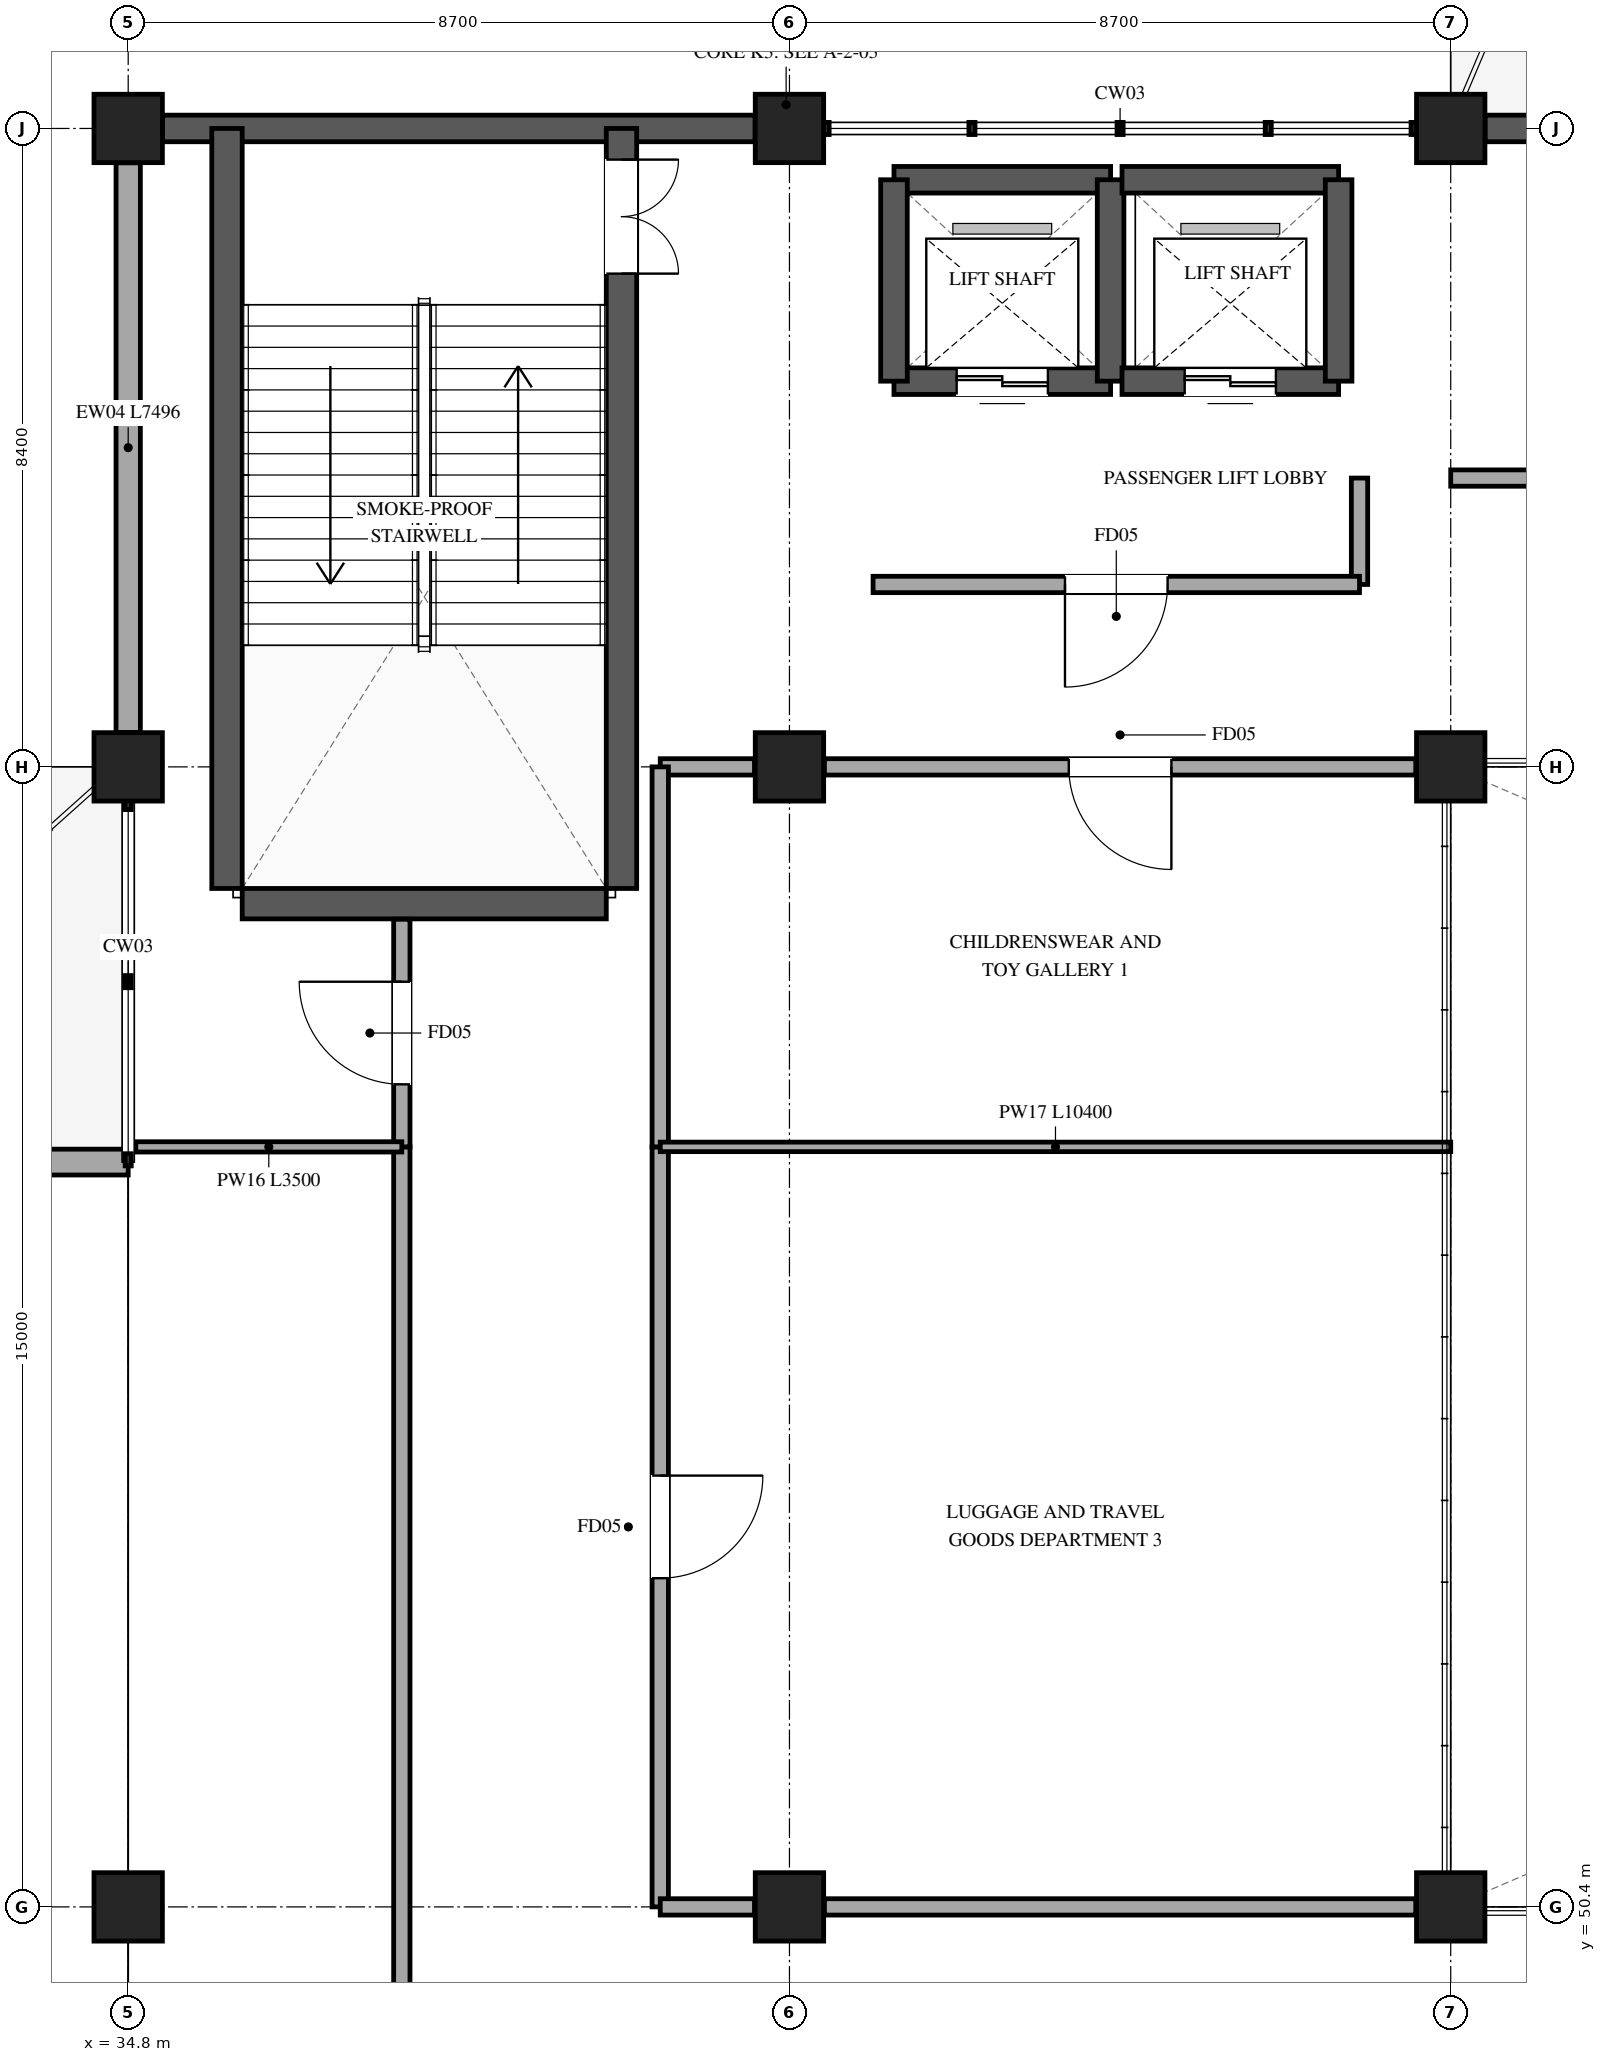
"""IFC4 building model, lengths in metres.
Left out: names, types, materials, properties, quantities, classifications, styles, units other than length and angle.
Written with IfcOpenShell. Run it as: python <this file> out.ifc"""

import sys

from ifc_helpers import new_model, si_unit, direction, frame, frame_2d, origin, origin_2d, place, context, subcontext, project, spatial, rectangle, extrude, element, fill, save


model = new_model("IFC4")
c1 = context("Model", 3, precision=1e-05, world=origin(), true_north=direction((0.0, 1.0)))
c2 = subcontext(c1, "Body", "Model", "MODEL_VIEW")
j1 = project(units=[si_unit("LENGTHUNIT", "METRE"), si_unit("PLANEANGLEUNIT", "RADIAN")], contexts=[c1])
p1 = place(None, origin())
s1 = spatial("IfcSite", under=j1, at=p1, CompositionType="ELEMENT")
p2 = place(p1, origin())
s2 = spatial("IfcBuilding", under=s1, at=p2, CompositionType="ELEMENT")
p3 = place(p2, frame((0.0, 0.0, 11.4)))
s3 = spatial("IfcBuildingStorey", under=s2, at=p3, CompositionType="ELEMENT", Elevation=11.4)
for number, where, z_axis, x_axis in (
    (1, (34.8, 50.4, 0.0), (0.0, 0.0, 1.0), (1.0, 0.0, 0.0)),
    (2, (34.8, 65.4, 0.0), (0.0, 0.0, 1.0), (1.0, 0.0, 0.0)),
    (3, (34.8, 73.8, 0.0), (0.0, 0.0, 1.0), (1.0, 0.0, 0.0)),
    (4, (43.5, 50.4, 0.0), (0.0, 0.0, 1.0), (1.0, 0.0, 0.0)),
    (5, (43.5, 65.4, 0.0), (0.0, 0.0, 1.0), (1.0, 0.0, 0.0)),
    (6, (43.5, 73.8, 0.0), (0.0, 0.0, 1.0), (1.0, 0.0, 0.0)),
    (7, (52.2, 50.4, 0.0), (0.0, 0.0, 1.0), (1.0, 0.0, 0.0)),
    (8, (52.2, 65.4, 0.0), (0.0, 0.0, 1.0), (1.0, 0.0, 0.0)),
    (9, (52.2, 73.8, 0.0), (0.0, 0.0, 1.0), (1.0, 0.0, 0.0)),
):
    element("IfcColumn", number, at=place(p3, frame(where, z_axis=z_axis, x_axis=x_axis)), inside=s3, PredefinedType="COLUMN", context=c2, shape_type="SweptSolid", body=[
        extrude(rectangle(XDim=0.9, YDim=0.9, at=origin_2d()), origin(), (0.0, 0.0, 1.0), 5.1),
    ])
p4 = place(p3, frame((25.7, 60.2, 0.0), z_axis=(0.0, 0.0, 1.0), x_axis=(1.0, 0.0, 0.0)))
e10 = element("IfcWall", 10, at=p4, inside=s3, PredefinedType="STANDARD", context=c2, shape_type="SweptSolid", body=[
    extrude(rectangle(XDim=9.1, YDim=0.34, at=frame_2d((4.55, 0.0))), origin(), (0.0, 0.0, 1.0), 4.317),
])
p5 = place(p4, frame((2.55, 0.0, 0.85)))
e11 = element("IfcOpeningElement", 11, at=p5, cuts=e10, PredefinedType="OPENING", context=c2, shape_type="SweptSolid", body=[
    extrude(rectangle(XDim=4.0, YDim=2.15, at=frame_2d((2.0, 1.075))), frame((0.0, 0.18, 0.0), z_axis=(0.0, -1.0, 0.0), x_axis=(1.0, 0.0, 0.0)), (0.0, 0.0, 1.0), 0.36),
])
p6 = place(p3, frame((34.8, 65.852, 0.0), z_axis=(0.0, 0.0, 1.0), x_axis=(0.0, 1.0, 0.0)))
e12 = element("IfcWall", 12, at=p6, inside=s3, PredefinedType="STANDARD", context=c2, shape_type="SweptSolid", body=[
    extrude(rectangle(XDim=7.496, YDim=0.32, at=frame_2d((3.748, 0.0))), origin(), (0.0, 0.0, 1.0), 4.155),
])
p7 = place(p3, frame((35.252, 73.8, 0.0), z_axis=(0.0, 0.0, 1.0), x_axis=(1.0, 0.0, 0.0)))
e13 = element("IfcWall", 13, at=p7, inside=s3, PredefinedType="STANDARD", context=c2, shape_type="SweptSolid", body=[
    extrude(rectangle(XDim=7.796, YDim=0.35, at=frame_2d((3.898, 0.0))), origin(), (0.0, 0.0, 1.0), 4.79),
])
p8 = place(p3, frame((52.652, 73.8, 0.0), z_axis=(0.0, 0.0, 1.0), x_axis=(1.0, 0.0, 0.0)))
e14 = element("IfcWall", 14, at=p8, inside=s3, PredefinedType="STANDARD", context=c2, shape_type="SweptSolid", body=[
    extrude(rectangle(XDim=5.348, YDim=0.35, at=frame_2d((2.674, 0.0))), origin(), (0.0, 0.0, 1.0), 4.79),
])
p9 = place(p8, frame((2.124, 0.0, 0.0)))
e15 = element("IfcOpeningElement", 15, at=p9, cuts=e14, PredefinedType="OPENING", context=c2, shape_type="SweptSolid", body=[
    extrude(rectangle(XDim=1.1, YDim=2.2, at=frame_2d((0.55, 1.1))), frame((0.0, 0.185, 0.0), z_axis=(0.0, -1.0, 0.0), x_axis=(1.0, 0.0, 0.0)), (0.0, 0.0, 1.0), 0.37),
])
p10 = place(p3, frame((36.1, 63.8, 0.0), z_axis=(0.0, 0.0, 1.0), x_axis=(0.0, 1.0, 0.0)))
e16 = element("IfcWall", 16, at=p10, inside=s3, PredefinedType="SHEAR", context=c2, shape_type="SweptSolid", body=[
    extrude(rectangle(XDim=10.0, YDim=0.4, at=frame_2d((5.0, 0.0))), origin(), (0.0, 0.0, 1.0), 5.1),
])
p11 = place(p3, frame((41.29, 73.8, 0.0), z_axis=(0.0, 0.0, 1.0), x_axis=(0.0, -1.0, 0.0)))
e17 = element("IfcWall", 17, at=p11, inside=s3, PredefinedType="SHEAR", context=c2, shape_type="SweptSolid", body=[
    extrude(rectangle(XDim=10.0, YDim=0.4, at=frame_2d((5.0, 0.0))), origin(), (0.0, 0.0, 1.0), 5.1),
])
p12 = place(p11, frame((0.41, 0.0, 0.0)))
e18 = element("IfcOpeningElement", 18, at=p12, cuts=e17, PredefinedType="OPENING", context=c2, shape_type="SweptSolid", body=[
    extrude(rectangle(XDim=1.5, YDim=2.2, at=frame_2d((0.75, 1.1))), frame((0.0, 0.21, 0.0), z_axis=(0.0, -1.0, 0.0), x_axis=(1.0, 0.0, 0.0)), (0.0, 0.0, 1.0), 0.42),
])
p13 = place(p3, frame((41.09, 63.6, 0.0), z_axis=(0.0, 0.0, 1.0), x_axis=(-1.0, 0.0, 0.0)))
e19 = element("IfcWall", 19, at=p13, inside=s3, PredefinedType="SHEAR", context=c2, shape_type="SweptSolid", body=[
    extrude(rectangle(XDim=4.79, YDim=0.4, at=frame_2d((2.395, 0.0))), origin(), (0.0, 0.0, 1.0), 5.1),
])
p14 = place(p3, frame((44.875, 73.125, 0.0), z_axis=(0.0, 0.0, 1.0), x_axis=(1.0, 0.0, 0.0)))
e20 = element("IfcWall", 20, at=p14, inside=s3, PredefinedType="SHEAR", context=c2, shape_type="SweptSolid", body=[
    extrude(rectangle(XDim=2.85, YDim=0.35, at=frame_2d((1.425, 0.0))), origin(), (0.0, 0.0, 1.0), 5.1),
])
p15 = place(p3, frame((47.725, 70.475, 0.0), z_axis=(0.0, 0.0, 1.0), x_axis=(-1.0, 0.0, 0.0)))
e21 = element("IfcWall", 21, at=p15, inside=s3, PredefinedType="SHEAR", context=c2, shape_type="SweptSolid", body=[
    extrude(rectangle(XDim=2.85, YDim=0.35, at=frame_2d((1.425, 0.0))), origin(), (0.0, 0.0, 1.0), 5.1),
])
p16 = place(p15, frame((0.825, 0.0, 0.0)))
e22 = element("IfcOpeningElement", 22, at=p16, cuts=e21, PredefinedType="OPENING", context=c2, shape_type="SweptSolid", body=[
    extrude(rectangle(XDim=1.2, YDim=2.2, at=frame_2d((0.6, 1.1))), frame((0.0, 0.185, 0.0), z_axis=(0.0, -1.0, 0.0), x_axis=(1.0, 0.0, 0.0)), (0.0, 0.0, 1.0), 0.37),
])
for number, where, z_axis, x_axis in (
    (23, (44.875, 70.475, 0.0), (0.0, 0.0, 1.0), (0.0, 1.0, 0.0)),
    (24, (47.725, 73.125, 0.0), (0.0, 0.0, 1.0), (0.0, -1.0, 0.0)),
):
    element("IfcWall", number, at=place(p3, frame(where, z_axis=z_axis, x_axis=x_axis)), inside=s3, PredefinedType="SHEAR", context=c2, shape_type="SweptSolid", body=[
        extrude(rectangle(XDim=2.65, YDim=0.35, at=frame_2d((1.325, 0.0))), origin(), (0.0, 0.0, 1.0), 5.1),
    ])
p17 = place(p3, frame((47.875, 73.125, 0.0), z_axis=(0.0, 0.0, 1.0), x_axis=(1.0, 0.0, 0.0)))
e25 = element("IfcWall", 25, at=p17, inside=s3, PredefinedType="SHEAR", context=c2, shape_type="SweptSolid", body=[
    extrude(rectangle(XDim=2.85, YDim=0.35, at=frame_2d((1.425, 0.0))), origin(), (0.0, 0.0, 1.0), 5.1),
])
p18 = place(p3, frame((50.725, 70.475, 0.0), z_axis=(0.0, 0.0, 1.0), x_axis=(-1.0, 0.0, 0.0)))
e26 = element("IfcWall", 26, at=p18, inside=s3, PredefinedType="SHEAR", context=c2, shape_type="SweptSolid", body=[
    extrude(rectangle(XDim=2.85, YDim=0.35, at=frame_2d((1.425, 0.0))), origin(), (0.0, 0.0, 1.0), 5.1),
])
p19 = place(p18, frame((0.825, 0.0, 0.0)))
e27 = element("IfcOpeningElement", 27, at=p19, cuts=e26, PredefinedType="OPENING", context=c2, shape_type="SweptSolid", body=[
    extrude(rectangle(XDim=1.2, YDim=2.2, at=frame_2d((0.6, 1.1))), frame((0.0, 0.185, 0.0), z_axis=(0.0, -1.0, 0.0), x_axis=(1.0, 0.0, 0.0)), (0.0, 0.0, 1.0), 0.37),
])
p20 = place(p3, frame((50.725, 73.125, 0.0), z_axis=(0.0, 0.0, 1.0), x_axis=(0.0, -1.0, 0.0)))
e28 = element("IfcWall", 28, at=p20, inside=s3, PredefinedType="SHEAR", context=c2, shape_type="SweptSolid", body=[
    extrude(rectangle(XDim=2.65, YDim=0.35, at=frame_2d((1.325, 0.0))), origin(), (0.0, 0.0, 1.0), 5.1),
])
p21 = place(p3, frame((51.0, 69.2, 0.0), z_axis=(0.0, 0.0, 1.0), x_axis=(0.0, -1.0, 0.0)))
e29 = element("IfcWall", 29, at=p21, inside=s3, PredefinedType="PARTITIONING", context=c2, shape_type="SweptSolid", body=[
    extrude(rectangle(XDim=1.4, YDim=0.215, at=frame_2d((0.7, 0.0))), origin(), (0.0, 0.0, 1.0), 4.76),
])
p22 = place(p3, frame((51.0, 67.8, 0.0), z_axis=(0.0, 0.0, 1.0), x_axis=(-1.0, 0.0, 0.0)))
e30 = element("IfcWall", 30, at=p22, inside=s3, PredefinedType="PARTITIONING", context=c2, shape_type="SweptSolid", body=[
    extrude(rectangle(XDim=6.4, YDim=0.215, at=frame_2d((3.2, 0.0))), origin(), (0.0, 0.0, 1.0), 4.76),
])
p23 = place(p22, frame((2.525, 0.0, 0.0)))
e31 = element("IfcOpeningElement", 31, at=p23, cuts=e30, PredefinedType="OPENING", context=c2, shape_type="SweptSolid", body=[
    extrude(rectangle(XDim=1.35, YDim=2.2, at=frame_2d((0.675, 1.1))), frame((0.0, 0.118, 0.0), z_axis=(0.0, -1.0, 0.0), x_axis=(1.0, 0.0, 0.0)), (0.0, 0.0, 1.0), 0.235),
])
p24 = place(p3, frame((38.4, 47.4, 0.0), z_axis=(0.0, 0.0, 1.0), x_axis=(0.0, 1.0, 0.0)))
e32 = element("IfcWall", 32, at=p24, inside=s3, PredefinedType="PARTITIONING", context=c2, shape_type="SweptSolid", body=[
    extrude(rectangle(XDim=13.0, YDim=0.215, at=frame_2d((6.5, 0.0))), origin(), (0.0, 0.0, 1.0), 3.86),
])
p25 = place(p3, frame((41.8, 60.4, 0.0), z_axis=(0.0, 0.0, 1.0), x_axis=(0.0, -1.0, 0.0)))
e33 = element("IfcWall", 33, at=p25, inside=s3, PredefinedType="PARTITIONING", context=c2, shape_type="SweptSolid", body=[
    extrude(rectangle(XDim=10.0, YDim=0.215, at=frame_2d((5.0, 0.0))), origin(), (0.0, 0.0, 1.0), 3.86),
])
p26 = place(p25, frame((4.325, 0.0, 0.0)))
e34 = element("IfcOpeningElement", 34, at=p26, cuts=e33, PredefinedType="OPENING", context=c2, shape_type="SweptSolid", body=[
    extrude(rectangle(XDim=1.35, YDim=2.2, at=frame_2d((0.675, 1.1))), frame((0.0, 0.118, 0.0), z_axis=(0.0, -1.0, 0.0), x_axis=(1.0, 0.0, 0.0)), (0.0, 0.0, 1.0), 0.235),
])
p27 = place(p3, frame((41.8, 50.4, 0.0), z_axis=(0.0, 0.0, 1.0), x_axis=(1.0, 0.0, 0.0)))
e35 = element("IfcWall", 35, at=p27, inside=s3, PredefinedType="PARTITIONING", context=c2, shape_type="SweptSolid", body=[
    extrude(rectangle(XDim=1.24, YDim=0.215, at=frame_2d((0.62, 0.0))), origin(), (0.0, 0.0, 1.0), 3.86),
])
p28 = place(p3, frame((43.96, 50.4, 0.0), z_axis=(0.0, 0.0, 1.0), x_axis=(1.0, 0.0, 0.0)))
e36 = element("IfcWall", 36, at=p28, inside=s3, PredefinedType="PARTITIONING", context=c2, shape_type="SweptSolid", body=[
    extrude(rectangle(XDim=7.78, YDim=0.215, at=frame_2d((3.89, 0.0))), origin(), (0.0, 0.0, 1.0), 3.86),
])
p29 = place(p3, frame((51.74, 65.4, 0.0), z_axis=(0.0, 0.0, 1.0), x_axis=(-1.0, 0.0, 0.0)))
e37 = element("IfcWall", 37, at=p29, inside=s3, PredefinedType="PARTITIONING", context=c2, shape_type="SweptSolid", body=[
    extrude(rectangle(XDim=7.78, YDim=0.215, at=frame_2d((3.89, 0.0))), origin(), (0.0, 0.0, 1.0), 3.86),
])
p30 = place(p29, frame((3.215, 0.0, 0.0)))
e38 = element("IfcOpeningElement", 38, at=p30, cuts=e37, PredefinedType="OPENING", context=c2, shape_type="SweptSolid", body=[
    extrude(rectangle(XDim=1.35, YDim=2.2, at=frame_2d((0.675, 1.1))), frame((0.0, 0.118, 0.0), z_axis=(0.0, -1.0, 0.0), x_axis=(1.0, 0.0, 0.0)), (0.0, 0.0, 1.0), 0.235),
])
p31 = place(p3, frame((43.04, 65.4, 0.0), z_axis=(0.0, 0.0, 1.0), x_axis=(-1.0, 0.0, 0.0)))
e39 = element("IfcWall", 39, at=p31, inside=s3, PredefinedType="PARTITIONING", context=c2, shape_type="SweptSolid", body=[
    extrude(rectangle(XDim=1.24, YDim=0.215, at=frame_2d((0.62, 0.0))), origin(), (0.0, 0.0, 1.0), 4.76),
])
p32 = place(p3, frame((41.8, 65.4, 0.0), z_axis=(0.0, 0.0, 1.0), x_axis=(0.0, -1.0, 0.0)))
e40 = element("IfcWall", 40, at=p32, inside=s3, PredefinedType="PARTITIONING", context=c2, shape_type="SweptSolid", body=[
    extrude(rectangle(XDim=5.0, YDim=0.215, at=frame_2d((2.5, 0.0))), origin(), (0.0, 0.0, 1.0), 4.46),
])
p33 = place(p3, frame((38.4, 60.4, 0.0), z_axis=(0.0, 0.0, 1.0), x_axis=(0.0, 1.0, 0.0)))
e41 = element("IfcWall", 41, at=p33, inside=s3, PredefinedType="PARTITIONING", context=c2, shape_type="SweptSolid", body=[
    extrude(rectangle(XDim=2.995, YDim=0.215, at=frame_2d((1.498, 0.0))), origin(), (0.0, 0.0, 1.0), 4.46),
])
p34 = place(p33, frame((0.823, 0.0, 0.0)))
e42 = element("IfcOpeningElement", 42, at=p34, cuts=e41, PredefinedType="OPENING", context=c2, shape_type="SweptSolid", body=[
    extrude(rectangle(XDim=1.35, YDim=2.2, at=frame_2d((0.675, 1.1))), frame((0.0, 0.118, 0.0), z_axis=(0.0, -1.0, 0.0), x_axis=(1.0, 0.0, 0.0)), (0.0, 0.0, 1.0), 0.235),
])
p35 = place(p3, frame((52.2, 69.2, 0.0), z_axis=(0.0, 0.0, 1.0), x_axis=(1.0, 0.0, 0.0)))
e43 = element("IfcWall", 43, at=p35, inside=s3, PredefinedType="PARTITIONING", context=c2, shape_type="SweptSolid", body=[
    extrude(rectangle(XDim=36.0, YDim=0.215, at=frame_2d((18.0, 0.0))), origin(), (0.0, 0.0, 1.0), 4.06),
])
p36 = place(p35, frame((17.325, 0.0, 0.0)))
e44 = element("IfcOpeningElement", 44, at=p36, cuts=e43, PredefinedType="OPENING", context=c2, shape_type="SweptSolid", body=[
    extrude(rectangle(XDim=1.35, YDim=2.2, at=frame_2d((0.675, 1.1))), frame((0.0, 0.118, 0.0), z_axis=(0.0, -1.0, 0.0), x_axis=(1.0, 0.0, 0.0)), (0.0, 0.0, 1.0), 0.235),
])
p37 = place(p3, frame((34.9, 60.4, 0.0), z_axis=(0.0, 0.0, 1.0), x_axis=(1.0, 0.0, 0.0)))
e45 = element("IfcWall", 45, at=p37, inside=s3, PredefinedType="PARTITIONING", context=c2, shape_type="SweptSolid", body=[
    extrude(rectangle(XDim=3.5, YDim=0.135, at=frame_2d((1.75, 0.0))), origin(), (0.0, 0.0, 1.0), 4.322),
])
p38 = place(p3, frame((41.8, 60.4, 0.0), z_axis=(0.0, 0.0, 1.0), x_axis=(1.0, 0.0, 0.0)))
e46 = element("IfcWall", 46, at=p38, inside=s3, PredefinedType="PARTITIONING", context=c2, shape_type="SweptSolid", body=[
    extrude(rectangle(XDim=10.4, YDim=0.125, at=frame_2d((5.2, 0.0))), origin(), (0.0, 0.0, 1.0), 4.322),
])
p39 = place(p12, origin())
e47 = element("IfcDoor", 47, at=p39, inside=s3, OperationType="DOUBLE_DOOR_SINGLE_SWING", PredefinedType="DOOR", context=c2, shape_type="SweptSolid", body=[
    extrude(rectangle(XDim=1.5, YDim=2.2, at=frame_2d((0.75, 1.1))), frame((0.0, 0.025, 0.0), z_axis=(0.0, -1.0, 0.0), x_axis=(1.0, 0.0, 0.0)), (0.0, 0.0, 1.0), 0.05),
])
fill(e18, e47)
p40 = place(p16, origin())
e48 = element("IfcDoor", 48, at=p40, inside=s3, OperationType="DOUBLE_DOOR_SLIDING", PredefinedType="DOOR", context=c2, shape_type="SweptSolid", body=[
    extrude(rectangle(XDim=1.2, YDim=2.2, at=frame_2d((0.6, 1.1))), frame((0.0, 0.025, 0.0), z_axis=(0.0, -1.0, 0.0), x_axis=(1.0, 0.0, 0.0)), (0.0, 0.0, 1.0), 0.05),
])
fill(e22, e48)
p41 = place(p19, origin())
e49 = element("IfcDoor", 49, at=p41, inside=s3, OperationType="DOUBLE_DOOR_SLIDING", PredefinedType="DOOR", context=c2, shape_type="SweptSolid", body=[
    extrude(rectangle(XDim=1.2, YDim=2.2, at=frame_2d((0.6, 1.1))), frame((0.0, 0.025, 0.0), z_axis=(0.0, -1.0, 0.0), x_axis=(1.0, 0.0, 0.0)), (0.0, 0.0, 1.0), 0.05),
])
fill(e27, e49)
p42 = place(p23, origin())
e50 = element("IfcDoor", 50, at=p42, inside=s3, OperationType="SINGLE_SWING_RIGHT", PredefinedType="DOOR", context=c2, shape_type="SweptSolid", body=[
    extrude(rectangle(XDim=1.35, YDim=2.2, at=frame_2d((0.675, 1.1))), frame((0.0, 0.025, 0.0), z_axis=(0.0, -1.0, 0.0), x_axis=(1.0, 0.0, 0.0)), (0.0, 0.0, 1.0), 0.05),
])
fill(e31, e50)
p43 = place(p26, origin())
e51 = element("IfcDoor", 51, at=p43, inside=s3, OperationType="SINGLE_SWING_LEFT", PredefinedType="DOOR", context=c2, shape_type="SweptSolid", body=[
    extrude(rectangle(XDim=1.35, YDim=2.2, at=frame_2d((0.675, 1.1))), frame((0.0, 0.025, 0.0), z_axis=(0.0, -1.0, 0.0), x_axis=(1.0, 0.0, 0.0)), (0.0, 0.0, 1.0), 0.05),
])
fill(e34, e51)
p44 = place(p30, origin())
e52 = element("IfcDoor", 52, at=p44, inside=s3, OperationType="SINGLE_SWING_LEFT", PredefinedType="DOOR", context=c2, shape_type="SweptSolid", body=[
    extrude(rectangle(XDim=1.35, YDim=2.2, at=frame_2d((0.675, 1.1))), frame((0.0, 0.025, 0.0), z_axis=(0.0, -1.0, 0.0), x_axis=(1.0, 0.0, 0.0)), (0.0, 0.0, 1.0), 0.05),
])
fill(e38, e52)
p45 = place(p34, origin())
e53 = element("IfcDoor", 53, at=p45, inside=s3, OperationType="SINGLE_SWING_RIGHT", PredefinedType="DOOR", context=c2, shape_type="SweptSolid", body=[
    extrude(rectangle(XDim=1.35, YDim=2.2, at=frame_2d((0.675, 1.1))), frame((0.0, 0.025, 0.0), z_axis=(0.0, -1.0, 0.0), x_axis=(1.0, 0.0, 0.0)), (0.0, 0.0, 1.0), 0.05),
])
fill(e42, e53)
save(model, sys.argv[1])
